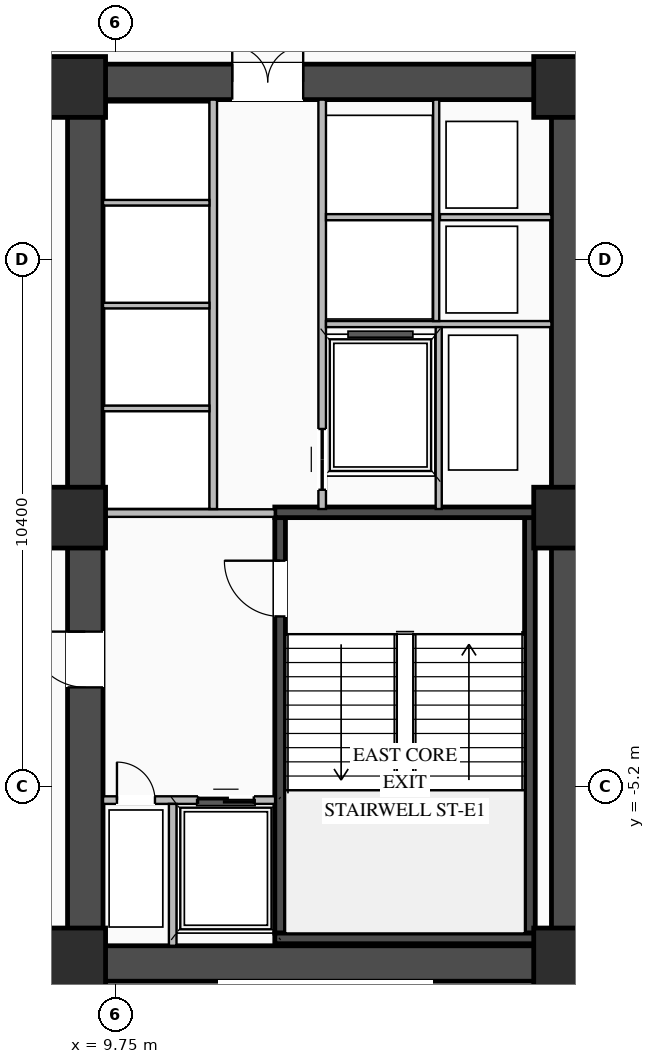
"""IFC4 building model, lengths in metres.
Left out: names, types, materials, properties, quantities, classifications, styles, units other than length and angle.
Written with IfcOpenShell. Run it as: python <this file> out.ifc"""

import sys

from ifc_helpers import new_model, si_unit, direction, frame, frame_2d, origin, origin_2d, place, context, subcontext, project, spatial, rectangle, extrude, element, fill, save


model = new_model("IFC4")
c1 = context("Model", 3, precision=1e-05, world=origin(), true_north=direction((0.0, 1.0)))
c2 = subcontext(c1, "Body", "Model", "MODEL_VIEW")
j1 = project(units=[si_unit("LENGTHUNIT", "METRE"), si_unit("PLANEANGLEUNIT", "RADIAN")], contexts=[c1])
p1 = place(None, origin())
s1 = spatial("IfcSite", under=j1, at=p1, CompositionType="ELEMENT")
p2 = place(p1, origin())
s2 = spatial("IfcBuilding", under=s1, at=p2, CompositionType="ELEMENT")
p3 = place(p2, frame((0.0, 0.0, 14.1)))
s3 = spatial("IfcBuildingStorey", under=s2, at=p3, CompositionType="ELEMENT", Elevation=14.1)
p4 = place(p3, frame((8.8, -8.7, 0.0), z_axis=(0.0, 0.0, 1.0), x_axis=(1.0, 0.0, 0.0)))
e1 = element("IfcWall", 1, at=p4, inside=s3, PredefinedType="SHEAR", context=c2, shape_type="SweptSolid", body=[
    extrude(rectangle(XDim=10.25, YDim=0.7, at=frame_2d((5.125, 0.0))), origin(), (0.0, 0.0, 1.0), 4.25),
])
p5 = place(p3, frame((8.8, 8.7, 0.0), z_axis=(0.0, 0.0, 1.0), x_axis=(1.0, 0.0, 0.0)))
e2 = element("IfcWall", 2, at=p5, inside=s3, PredefinedType="SHEAR", context=c2, shape_type="SweptSolid", body=[
    extrude(rectangle(XDim=10.25, YDim=0.7, at=frame_2d((5.125, 0.0))), origin(), (0.0, 0.0, 1.0), 4.25),
])
p6 = place(p5, frame((3.25, 0.0, 0.0)))
e3 = element("IfcOpeningElement", 3, at=p6, cuts=e2, PredefinedType="OPENING", context=c2, shape_type="SweptSolid", body=[
    extrude(rectangle(XDim=1.4, YDim=2.05, at=frame_2d((0.7, 1.025))), frame((0.0, 0.36, 0.0), z_axis=(0.0, -1.0, 0.0), x_axis=(1.0, 0.0, 0.0)), (0.0, 0.0, 1.0), 0.72),
])
p7 = place(p3, frame((9.15, -8.35, 0.0), z_axis=(0.0, 0.0, 1.0), x_axis=(0.0, 1.0, 0.0)))
e4 = element("IfcWall", 4, at=p7, inside=s3, PredefinedType="SHEAR", context=c2, shape_type="SweptSolid", body=[
    extrude(rectangle(XDim=16.7, YDim=0.7, at=frame_2d((8.35, 0.0))), origin(), (0.0, 0.0, 1.0), 4.25),
])
p8 = place(p7, frame((5.1, 0.0, 0.0)))
e5 = element("IfcOpeningElement", 5, at=p8, cuts=e4, PredefinedType="OPENING", context=c2, shape_type="SweptSolid", body=[
    extrude(rectangle(XDim=1.1, YDim=2.08, at=frame_2d((0.55, 1.04))), frame((0.0, 0.36, 0.0), z_axis=(0.0, -1.0, 0.0), x_axis=(1.0, 0.0, 0.0)), (0.0, 0.0, 1.0), 0.72),
])
p9 = place(p3, frame((18.7, -8.35, 0.0), z_axis=(0.0, 0.0, 1.0), x_axis=(0.0, 1.0, 0.0)))
e6 = element("IfcWall", 6, at=p9, inside=s3, PredefinedType="SHEAR", context=c2, shape_type="SweptSolid", body=[
    extrude(rectangle(XDim=16.7, YDim=0.7, at=frame_2d((8.35, 0.0))), origin(), (0.0, 0.0, 1.0), 4.25),
])
p10 = place(p3, frame((12.995, -8.1, 0.0), z_axis=(0.0, 0.0, 1.0), x_axis=(0.0, 1.0, 0.0)))
e7 = element("IfcWall", 7, at=p10, inside=s3, PredefinedType="SHEAR", context=c2, shape_type="SweptSolid", body=[
    extrude(rectangle(XDim=8.2, YDim=0.21, at=frame_2d((4.1, 0.0))), origin(), (0.0, 0.0, 1.0), 4.25),
])
p11 = place(p10, frame((6.25, 0.0, 0.0)))
e8 = element("IfcOpeningElement", 8, at=p11, cuts=e7, PredefinedType="OPENING", context=c2, shape_type="SweptSolid", body=[
    extrude(rectangle(XDim=1.1, YDim=2.15, at=frame_2d((0.55, 1.075))), frame((0.0, 0.115, 0.0), z_axis=(0.0, -1.0, 0.0), x_axis=(1.0, 0.0, 0.0)), (0.0, 0.0, 1.0), 0.23),
])
p12 = place(p3, frame((17.925, -8.1, 0.0), z_axis=(0.0, 0.0, 1.0), x_axis=(0.0, 1.0, 0.0)))
e9 = element("IfcWall", 9, at=p12, inside=s3, PredefinedType="SHEAR", context=c2, shape_type="SweptSolid", body=[
    extrude(rectangle(XDim=8.2, YDim=0.21, at=frame_2d((4.1, 0.0))), origin(), (0.0, 0.0, 1.0), 4.25),
])
for number, where, z_axis, x_axis in (
    (10, (12.89, -8.205, 0.0), (0.0, 0.0, 1.0), (1.0, 0.0, 0.0)),
    (11, (18.03, 0.205, 0.0), (0.0, 0.0, 1.0), (-1.0, 0.0, 0.0)),
):
    element("IfcWall", number, at=place(p3, frame(where, z_axis=z_axis, x_axis=x_axis)), inside=s3, PredefinedType="SHEAR", context=c2, shape_type="SweptSolid", body=[
        extrude(rectangle(XDim=5.14, YDim=0.21, at=frame_2d((2.57, 0.0))), origin(), (0.0, 0.0, 1.0), 4.25),
    ])
for number, where, z_axis, x_axis in (
    (12, (8.95, -8.6, 0.0), (0.0, 0.0, 1.0), (1.0, 0.0, 0.0)),
    (13, (8.95, 0.1, 0.0), (0.0, 0.0, 1.0), (1.0, 0.0, 0.0)),
    (14, (8.95, 8.6, 0.0), (0.0, 0.0, 1.0), (1.0, 0.0, 0.0)),
    (15, (18.6, -8.6, 0.0), (0.0, 0.0, 1.0), (1.0, 0.0, 0.0)),
    (16, (18.6, 0.1, 0.0), (0.0, 0.0, 1.0), (1.0, 0.0, 0.0)),
    (17, (18.6, 8.6, 0.0), (0.0, 0.0, 1.0), (1.0, 0.0, 0.0)),
):
    element("IfcColumn", number, at=place(p3, frame(where, z_axis=z_axis, x_axis=x_axis)), inside=s3, PredefinedType="COLUMN", context=c2, shape_type="SweptSolid", body=[
        extrude(rectangle(XDim=1.2, YDim=1.2, at=origin_2d()), origin(), (0.0, 0.0, 1.0), 4.5),
    ])
p13 = place(p3, frame((9.5, -5.475, 0.0), z_axis=(0.0, 0.0, 1.0), x_axis=(1.0, 0.0, 0.0)))
e18 = element("IfcWall", 18, at=p13, inside=s3, PredefinedType="STANDARD", context=c2, shape_type="SweptSolid", body=[
    extrude(rectangle(XDim=3.395, YDim=0.15, at=frame_2d((1.698, 0.0))), origin(), (0.0, 0.0, 1.0), 4.23),
])
p14 = place(p13, frame((1.875, 0.0, 0.0)))
e19 = element("IfcOpeningElement", 19, at=p14, cuts=e18, PredefinedType="OPENING", context=c2, shape_type="SweptSolid", body=[
    extrude(rectangle(XDim=1.1, YDim=2.15, at=frame_2d((0.55, 1.075))), frame((0.0, 0.085, 0.0), z_axis=(0.0, -1.0, 0.0), x_axis=(1.0, 0.0, 0.0)), (0.0, 0.0, 1.0), 0.17),
])
p15 = place(p13, frame((0.275, 0.0, 0.0)))
e20 = element("IfcOpeningElement", 20, at=p15, cuts=e18, PredefinedType="OPENING", context=c2, shape_type="SweptSolid", body=[
    extrude(rectangle(XDim=0.75, YDim=2.05, at=frame_2d((0.375, 1.025))), frame((0.0, 0.085, 0.0), z_axis=(0.0, -1.0, 0.0), x_axis=(1.0, 0.0, 0.0)), (0.0, 0.0, 1.0), 0.17),
])
p16 = place(p3, frame((10.875, -8.35, 0.0), z_axis=(0.0, 0.0, 1.0), x_axis=(0.0, 1.0, 0.0)))
e21 = element("IfcWall", 21, at=p16, inside=s3, PredefinedType="STANDARD", context=c2, shape_type="SweptSolid", body=[
    extrude(rectangle(XDim=2.8, YDim=0.15, at=frame_2d((1.4, 0.0))), origin(), (0.0, 0.0, 1.0), 4.23),
])
p17 = place(p3, frame((9.5, 0.19, 0.0), z_axis=(0.0, 0.0, 1.0), x_axis=(1.0, 0.0, 0.0)))
e22 = element("IfcWall", 22, at=p17, inside=s3, PredefinedType="STANDARD", context=c2, shape_type="SweptSolid", body=[
    extrude(rectangle(XDim=3.39, YDim=0.15, at=frame_2d((1.695, 0.0))), origin(), (0.0, 0.0, 1.0), 3.525),
])
p18 = place(p3, frame((11.675, 0.27, 0.0), z_axis=(0.0, 0.0, 1.0), x_axis=(0.0, 1.0, 0.0)))
e23 = element("IfcWall", 23, at=p18, inside=s3, PredefinedType="STANDARD", context=c2, shape_type="SweptSolid", body=[
    extrude(rectangle(XDim=8.08, YDim=0.15, at=frame_2d((4.04, 0.0))), origin(), (0.0, 0.0, 1.0), 4.23),
])
for number, where, z_axis, x_axis in (
    (24, (9.5, 2.255, 0.0), (0.0, 0.0, 1.0), (1.0, 0.0, 0.0)),
    (25, (9.5, 4.285, 0.0), (0.0, 0.0, 1.0), (1.0, 0.0, 0.0)),
    (26, (9.5, 6.315, 0.0), (0.0, 0.0, 1.0), (1.0, 0.0, 0.0)),
):
    element("IfcWall", number, at=place(p3, frame(where, z_axis=z_axis, x_axis=x_axis)), inside=s3, PredefinedType="STANDARD", context=c2, shape_type="SweptSolid", body=[
        extrude(rectangle(XDim=2.1, YDim=0.11, at=frame_2d((1.05, 0.0))), origin(), (0.0, 0.0, 1.0), 4.23),
    ])
p19 = place(p3, frame((13.825, 0.27, 0.0), z_axis=(0.0, 0.0, 1.0), x_axis=(0.0, 1.0, 0.0)))
e27 = element("IfcWall", 27, at=p19, inside=s3, PredefinedType="STANDARD", context=c2, shape_type="SweptSolid", body=[
    extrude(rectangle(XDim=8.08, YDim=0.15, at=frame_2d((4.04, 0.0))), origin(), (0.0, 0.0, 1.0), 4.23),
])
p20 = place(p19, frame((0.38, 0.0, 0.0)))
e28 = element("IfcOpeningElement", 28, at=p20, cuts=e27, PredefinedType="OPENING", context=c2, shape_type="SweptSolid", body=[
    extrude(rectangle(XDim=1.2, YDim=2.1, at=frame_2d((0.6, 1.05))), frame((0.0, 0.085, 0.0), z_axis=(0.0, -1.0, 0.0), x_axis=(1.0, 0.0, 0.0)), (0.0, 0.0, 1.0), 0.17),
])
p21 = place(p3, frame((13.9, 3.92, 0.0), z_axis=(0.0, 0.0, 1.0), x_axis=(1.0, 0.0, 0.0)))
e29 = element("IfcWall", 29, at=p21, inside=s3, PredefinedType="STANDARD", context=c2, shape_type="SweptSolid", body=[
    extrude(rectangle(XDim=4.45, YDim=0.12, at=frame_2d((2.225, 0.0))), origin(), (0.0, 0.0, 1.0), 4.23),
])
p22 = place(p3, frame((16.15, 6.03, 0.0), z_axis=(0.0, 0.0, 1.0), x_axis=(1.0, 0.0, 0.0)))
e30 = element("IfcWall", 30, at=p22, inside=s3, PredefinedType="STANDARD", context=c2, shape_type="SweptSolid", body=[
    extrude(rectangle(XDim=2.2, YDim=0.12, at=frame_2d((1.1, 0.0))), origin(), (0.0, 0.0, 1.0), 4.23),
])
p23 = place(p3, frame((16.075, 3.98, 0.0), z_axis=(0.0, 0.0, 1.0), x_axis=(0.0, 1.0, 0.0)))
e31 = element("IfcWall", 31, at=p23, inside=s3, PredefinedType="STANDARD", context=c2, shape_type="SweptSolid", body=[
    extrude(rectangle(XDim=4.37, YDim=0.12, at=frame_2d((2.185, 0.0))), origin(), (0.0, 0.0, 1.0), 4.23),
])
p24 = place(p3, frame((13.9, 6.03, 0.0), z_axis=(0.0, 0.0, 1.0), x_axis=(1.0, 0.0, 0.0)))
e32 = element("IfcWall", 32, at=p24, inside=s3, PredefinedType="STANDARD", context=c2, shape_type="SweptSolid", body=[
    extrude(rectangle(XDim=2.1, YDim=0.12, at=frame_2d((1.05, 0.0))), origin(), (0.0, 0.0, 1.0), 4.23),
])
p25 = place(p3, frame((16.125, 0.27, 0.0), z_axis=(0.0, 0.0, 1.0), x_axis=(0.0, 1.0, 0.0)))
e33 = element("IfcWall", 33, at=p25, inside=s3, PredefinedType="STANDARD", context=c2, shape_type="SweptSolid", body=[
    extrude(rectangle(XDim=3.59, YDim=0.12, at=frame_2d((1.795, 0.0))), origin(), (0.0, 0.0, 1.0), 4.23),
])
p26 = place(p11, origin())
e34 = element("IfcDoor", 34, at=p26, inside=s3, OperationType="SINGLE_SWING_RIGHT", PredefinedType="DOOR", context=c2, shape_type="SweptSolid", body=[
    extrude(rectangle(XDim=1.1, YDim=2.15, at=frame_2d((0.55, 1.075))), frame((0.0, 0.025, 0.0), z_axis=(0.0, -1.0, 0.0), x_axis=(1.0, 0.0, 0.0)), (0.0, 0.0, 1.0), 0.05),
])
fill(e8, e34)
p27 = place(p14, origin())
e35 = element("IfcDoor", 35, at=p27, inside=s3, OperationType="DOUBLE_DOOR_SLIDING", PredefinedType="DOOR", context=c2, shape_type="SweptSolid", body=[
    extrude(rectangle(XDim=1.1, YDim=2.15, at=frame_2d((0.55, 1.075))), frame((0.0, 0.025, 0.0), z_axis=(0.0, -1.0, 0.0), x_axis=(1.0, 0.0, 0.0)), (0.0, 0.0, 1.0), 0.05),
])
fill(e19, e35)
p28 = place(p15, origin())
e36 = element("IfcDoor", 36, at=p28, inside=s3, OperationType="SINGLE_SWING_LEFT", PredefinedType="DOOR", context=c2, shape_type="SweptSolid", body=[
    extrude(rectangle(XDim=0.75, YDim=2.05, at=frame_2d((0.375, 1.025))), frame((0.0, 0.025, 0.0), z_axis=(0.0, -1.0, 0.0), x_axis=(1.0, 0.0, 0.0)), (0.0, 0.0, 1.0), 0.05),
])
fill(e20, e36)
p29 = place(p8, origin())
e37 = element("IfcDoor", 37, at=p29, inside=s3, OperationType="SINGLE_SWING_RIGHT", PredefinedType="DOOR", context=c2, shape_type="SweptSolid", body=[
    extrude(rectangle(XDim=1.1, YDim=2.08, at=frame_2d((0.55, 1.04))), frame((0.0, -0.255, 0.0), z_axis=(0.0, -1.0, 0.0), x_axis=(1.0, 0.0, 0.0)), (0.0, 0.0, 1.0), 0.05),
])
fill(e5, e37)
p30 = place(p6, origin())
e38 = element("IfcDoor", 38, at=p30, inside=s3, OperationType="DOUBLE_DOOR_SINGLE_SWING", PredefinedType="DOOR", context=c2, shape_type="SweptSolid", body=[
    extrude(rectangle(XDim=1.4, YDim=2.05, at=frame_2d((0.7, 1.025))), frame((0.0, 0.295, 0.0), z_axis=(0.0, -1.0, 0.0), x_axis=(1.0, 0.0, 0.0)), (0.0, 0.0, 1.0), 0.05),
])
fill(e3, e38)
p31 = place(p20, origin())
e39 = element("IfcDoor", 39, at=p31, inside=s3, OperationType="DOUBLE_DOOR_SLIDING", PredefinedType="DOOR", context=c2, shape_type="SweptSolid", body=[
    extrude(rectangle(XDim=1.2, YDim=2.1, at=frame_2d((0.6, 1.05))), frame((0.0, 0.025, 0.0), z_axis=(0.0, -1.0, 0.0), x_axis=(1.0, 0.0, 0.0)), (0.0, 0.0, 1.0), 0.05),
])
fill(e28, e39)
save(model, sys.argv[1])
